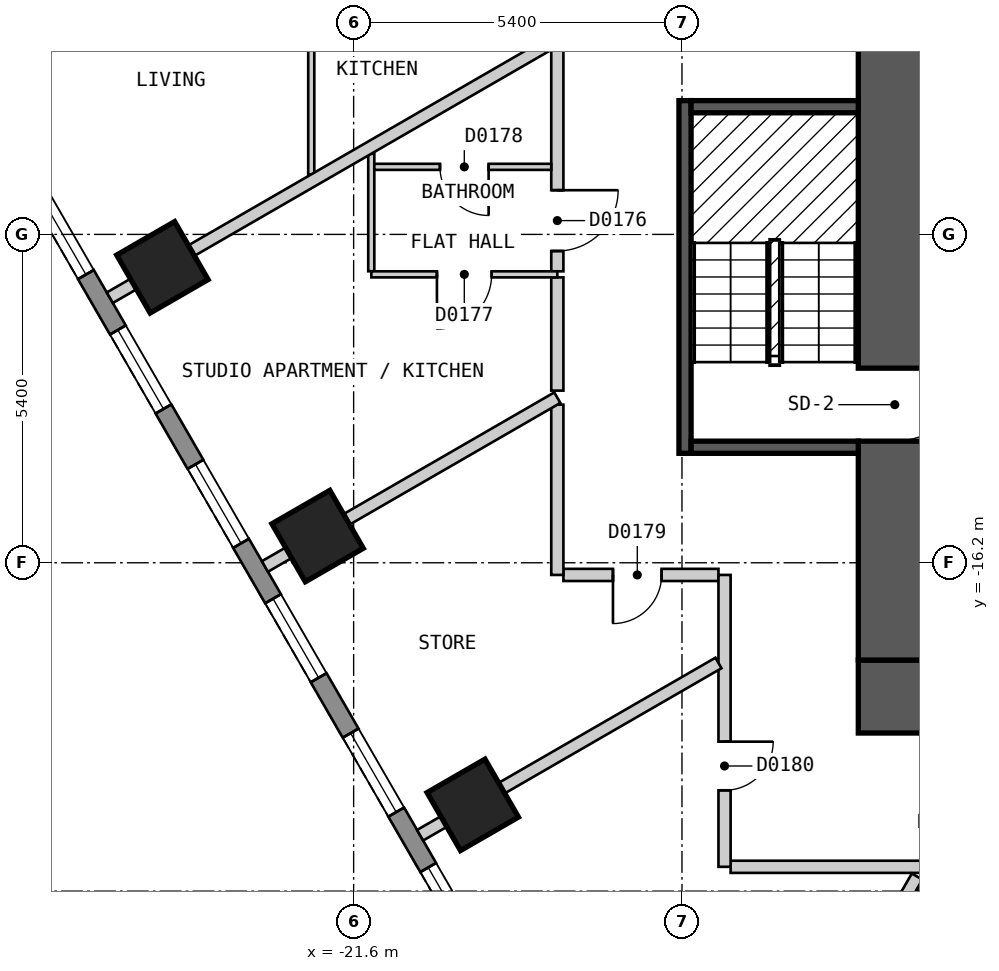
"""IFC4 building model, lengths in metres.
Left out: names, types, materials, properties, quantities, classifications, styles, units other than length and angle.
Written with IfcOpenShell. Run it as: python <this file> out.ifc"""

import sys

from ifc_helpers import new_model, si_unit, direction, frame, frame_2d, origin, origin_2d, place, context, subcontext, project, spatial, polyline, rectangle, outline, extrude, element, fill, save


model = new_model("IFC4")
c1 = context("Model", 3, precision=1e-05, world=origin(), true_north=direction((0.0, 1.0)))
c2 = subcontext(c1, "Body", "Model", "MODEL_VIEW")
j1 = project(units=[si_unit("LENGTHUNIT", "METRE"), si_unit("PLANEANGLEUNIT", "RADIAN")], contexts=[c1])
p1 = place(None, origin())
s1 = spatial("IfcSite", under=j1, at=p1, CompositionType="ELEMENT")
p2 = place(p1, origin())
s2 = spatial("IfcBuilding", under=s1, at=p2, CompositionType="ELEMENT")
p3 = place(p2, frame((0.0, 0.0, 23.4)))
s3 = spatial("IfcBuildingStorey", under=s2, at=p3, CompositionType="ELEMENT", Elevation=23.4)
for number, where, z_axis, x_axis in (
    (1, (-24.745, -11.341, 0.0), (0.0, 0.0, 1.0), (0.5, -0.866, 0.0)),
    (2, (-22.193, -15.761, 0.0), (0.0, 0.0, 1.0), (0.5, -0.866, 0.0)),
    (3, (-19.641, -20.181, 0.0), (0.0, 0.0, 1.0), (0.5, -0.866, 0.0)),
):
    element("IfcColumn", number, at=place(p3, frame(where, z_axis=z_axis, x_axis=x_axis)), inside=s3, PredefinedType="COLUMN", context=c2, shape_type="SweptSolid", body=[
        extrude(rectangle(XDim=1.1, YDim=1.1, at=origin_2d()), origin(), (0.0, 0.0, 1.0), 3.0),
    ])
p4 = place(p3, frame((-13.3, -18.4, 0.0), z_axis=(0.0, 0.0, 1.0), x_axis=(1.0, 0.0, 0.0)))
e4 = element("IfcWall", 4, at=p4, inside=s3, PredefinedType="SHEAR", context=c2, shape_type="SweptSolid", body=[
    extrude(rectangle(XDim=26.6, YDim=1.2, at=frame_2d((13.3, 0.0))), origin(), (0.0, 0.0, 1.0), 2.7),
])
p5 = place(p3, frame((-12.7, -17.8, 0.0), z_axis=(0.0, 0.0, 1.0), x_axis=(0.0, 1.0, 0.0)))
e5 = element("IfcWall", 5, at=p5, inside=s3, PredefinedType="SHEAR", context=c2, shape_type="SweptSolid", body=[
    extrude(rectangle(XDim=11.6, YDim=1.2, at=frame_2d((5.8, 0.0))), origin(), (0.0, 0.0, 1.0), 2.7),
])
p6 = place(p5, frame((3.6, 0.0, 0.0)))
e6 = element("IfcOpeningElement", 6, at=p6, cuts=e5, PredefinedType="OPENING", context=c2, shape_type="SweptSolid", body=[
    extrude(rectangle(XDim=1.2, YDim=2.1, at=frame_2d((0.6, 1.05))), frame((0.0, 0.61, 0.0), z_axis=(0.0, -1.0, 0.0), x_axis=(1.0, 0.0, 0.0)), (0.0, 0.0, 1.0), 1.22),
])
p7 = place(p3, frame((-31.22, -2.425, 0.0), z_axis=(0.0, 0.0, 1.0), x_axis=(0.500001938803, -0.866024284413, 0.0)))
e7 = element("IfcWall", 7, at=p7, inside=s3, PredefinedType="SOLIDWALL", context=c2, shape_type="SweptSolid", body=[
    extrude(outline(polyline([(0.0, -0.15), (27.02, -0.15), (26.94, 0.15), (0.08, 0.15), (0.0, -0.15)])), origin(), (0.0, 0.0, 1.0), 2.7),
])
p8 = place(p7, frame((1.277, 0.0, 0.15)))
e8 = element("IfcOpeningElement", 8, at=p8, cuts=e7, PredefinedType="OPENING", context=c2, shape_type="SweptSolid", body=[
    extrude(rectangle(XDim=1.5, YDim=2.1, at=frame_2d((0.75, 1.05))), frame((0.0, 0.16, 0.0), z_axis=(0.0, -1.0, 0.0), x_axis=(1.0, 0.0, 0.0)), (0.0, 0.0, 1.0), 0.32),
])
p9 = place(p7, frame((3.829, 0.0, 0.15)))
e9 = element("IfcOpeningElement", 9, at=p9, cuts=e7, PredefinedType="OPENING", context=c2, shape_type="SweptSolid", body=[
    extrude(rectangle(XDim=1.5, YDim=2.1, at=frame_2d((0.75, 1.05))), frame((0.0, 0.16, 0.0), z_axis=(0.0, -1.0, 0.0), x_axis=(1.0, 0.0, 0.0)), (0.0, 0.0, 1.0), 0.32),
])
p10 = place(p7, frame((6.382, 0.0, 0.15)))
e10 = element("IfcOpeningElement", 10, at=p10, cuts=e7, PredefinedType="OPENING", context=c2, shape_type="SweptSolid", body=[
    extrude(rectangle(XDim=1.5, YDim=2.1, at=frame_2d((0.75, 1.05))), frame((0.0, 0.16, 0.0), z_axis=(0.0, -1.0, 0.0), x_axis=(1.0, 0.0, 0.0)), (0.0, 0.0, 1.0), 0.32),
])
p11 = place(p7, frame((8.933, 0.0, 0.15)))
e11 = element("IfcOpeningElement", 11, at=p11, cuts=e7, PredefinedType="OPENING", context=c2, shape_type="SweptSolid", body=[
    extrude(rectangle(XDim=1.5, YDim=2.1, at=frame_2d((0.75, 1.05))), frame((0.0, 0.16, 0.0), z_axis=(0.0, -1.0, 0.0), x_axis=(1.0, 0.0, 0.0)), (0.0, 0.0, 1.0), 0.32),
])
p12 = place(p7, frame((11.485, 0.0, 0.15)))
e12 = element("IfcOpeningElement", 12, at=p12, cuts=e7, PredefinedType="OPENING", context=c2, shape_type="SweptSolid", body=[
    extrude(rectangle(XDim=1.5, YDim=2.1, at=frame_2d((0.75, 1.05))), frame((0.0, 0.16, 0.0), z_axis=(0.0, -1.0, 0.0), x_axis=(1.0, 0.0, 0.0)), (0.0, 0.0, 1.0), 0.32),
])
p13 = place(p7, frame((14.037, 0.0, 0.15)))
e13 = element("IfcOpeningElement", 13, at=p13, cuts=e7, PredefinedType="OPENING", context=c2, shape_type="SweptSolid", body=[
    extrude(rectangle(XDim=1.5, YDim=2.1, at=frame_2d((0.75, 1.05))), frame((0.0, 0.16, 0.0), z_axis=(0.0, -1.0, 0.0), x_axis=(1.0, 0.0, 0.0)), (0.0, 0.0, 1.0), 0.32),
])
p14 = place(p7, frame((16.589, 0.0, 0.15)))
e14 = element("IfcOpeningElement", 14, at=p14, cuts=e7, PredefinedType="OPENING", context=c2, shape_type="SweptSolid", body=[
    extrude(rectangle(XDim=1.5, YDim=2.1, at=frame_2d((0.75, 1.05))), frame((0.0, 0.16, 0.0), z_axis=(0.0, -1.0, 0.0), x_axis=(1.0, 0.0, 0.0)), (0.0, 0.0, 1.0), 0.32),
])
p15 = place(p7, frame((19.141, 0.0, 0.15)))
e15 = element("IfcOpeningElement", 15, at=p15, cuts=e7, PredefinedType="OPENING", context=c2, shape_type="SweptSolid", body=[
    extrude(rectangle(XDim=1.5, YDim=2.1, at=frame_2d((0.75, 1.05))), frame((0.0, 0.16, 0.0), z_axis=(0.0, -1.0, 0.0), x_axis=(1.0, 0.0, 0.0)), (0.0, 0.0, 1.0), 0.32),
])
p16 = place(p7, frame((21.693, 0.0, 0.15)))
e16 = element("IfcOpeningElement", 16, at=p16, cuts=e7, PredefinedType="OPENING", context=c2, shape_type="SweptSolid", body=[
    extrude(rectangle(XDim=1.5, YDim=2.1, at=frame_2d((0.75, 1.05))), frame((0.0, 0.16, 0.0), z_axis=(0.0, -1.0, 0.0), x_axis=(1.0, 0.0, 0.0)), (0.0, 0.0, 1.0), 0.32),
])
p17 = place(p7, frame((24.244, 0.0, 0.15)))
e17 = element("IfcOpeningElement", 17, at=p17, cuts=e7, PredefinedType="OPENING", context=c2, shape_type="SweptSolid", body=[
    extrude(rectangle(XDim=1.5, YDim=2.1, at=frame_2d((0.75, 1.05))), frame((0.0, 0.16, 0.0), z_axis=(0.0, -1.0, 0.0), x_axis=(1.0, 0.0, 0.0)), (0.0, 0.0, 1.0), 0.32),
])
p18 = place(p3, frame((-18.25, -11.507, 0.0), z_axis=(0.0, 0.0, 1.0), x_axis=(0.0, -1.0, 0.0)))
e18 = element("IfcWall", 18, at=p18, inside=s3, PredefinedType="PARTITIONING", context=c2, shape_type="SweptSolid", body=[
    extrude(rectangle(XDim=1.862, YDim=0.2, at=frame_2d((0.931, 0.0))), origin(), (0.0, 0.0, 1.0), 2.7),
])
p19 = place(p3, frame((-18.15, -16.4, 0.0), z_axis=(0.0, 0.0, 1.0), x_axis=(1.0, 0.0, 0.0)))
e19 = element("IfcWall", 19, at=p19, inside=s3, PredefinedType="PARTITIONING", context=c2, shape_type="SweptSolid", body=[
    extrude(rectangle(XDim=2.55, YDim=0.2, at=frame_2d((1.275, 0.0))), origin(), (0.0, 0.0, 1.0), 2.7),
])
p20 = place(p19, frame((0.815, 0.0, 0.0)))
e20 = element("IfcOpeningElement", 20, at=p20, cuts=e19, PredefinedType="OPENING", context=c2, shape_type="SweptSolid", body=[
    extrude(rectangle(XDim=0.8, YDim=2.1, at=frame_2d((0.4, 1.05))), frame((0.0, 0.11, 0.0), z_axis=(0.0, -1.0, 0.0), x_axis=(1.0, 0.0, 0.0)), (0.0, 0.0, 1.0), 0.22),
])
p21 = place(p3, frame((-15.4, -21.2, 0.0), z_axis=(0.0, 0.0, 1.0), x_axis=(1.0, 0.0, 0.0)))
e21 = element("IfcWall", 21, at=p21, inside=s3, PredefinedType="PARTITIONING", context=c2, shape_type="SweptSolid", body=[
    extrude(rectangle(XDim=30.799, YDim=0.2, at=frame_2d((15.399, 0.0))), origin(), (0.0, 0.0, 1.0), 2.7),
])
p22 = place(p21, frame((4.985, 0.0, 0.0)))
e22 = element("IfcOpeningElement", 22, at=p22, cuts=e21, PredefinedType="OPENING", context=c2, shape_type="SweptSolid", body=[
    extrude(rectangle(XDim=0.9, YDim=2.1, at=frame_2d((0.45, 1.05))), frame((0.0, 0.11, 0.0), z_axis=(0.0, -1.0, 0.0), x_axis=(1.0, 0.0, 0.0)), (0.0, 0.0, 1.0), 0.22),
])
p23 = place(p21, frame((14.901, 0.0, 0.0)))
e23 = element("IfcOpeningElement", 23, at=p23, cuts=e21, PredefinedType="OPENING", context=c2, shape_type="SweptSolid", body=[
    extrude(rectangle(XDim=1.0, YDim=2.1, at=frame_2d((0.5, 1.05))), frame((0.0, 0.11, 0.0), z_axis=(0.0, -1.0, 0.0), x_axis=(1.0, 0.0, 0.0)), (0.0, 0.0, 1.0), 0.22),
])
p24 = place(p21, frame((20.005, 0.0, 0.0)))
e24 = element("IfcOpeningElement", 24, at=p24, cuts=e21, PredefinedType="OPENING", context=c2, shape_type="SweptSolid", body=[
    extrude(rectangle(XDim=1.0, YDim=2.1, at=frame_2d((0.5, 1.05))), frame((0.0, 0.11, 0.0), z_axis=(0.0, -1.0, 0.0), x_axis=(1.0, 0.0, 0.0)), (0.0, 0.0, 1.0), 0.22),
])
p25 = place(p21, frame((24.916, 0.0, 0.0)))
e25 = element("IfcOpeningElement", 25, at=p25, cuts=e21, PredefinedType="OPENING", context=c2, shape_type="SweptSolid", body=[
    extrude(rectangle(XDim=0.9, YDim=2.1, at=frame_2d((0.45, 1.05))), frame((0.0, 0.11, 0.0), z_axis=(0.0, -1.0, 0.0), x_axis=(1.0, 0.0, 0.0)), (0.0, 0.0, 1.0), 0.22),
])
p26 = place(p3, frame((-15.5, -21.2, 0.0), z_axis=(0.0, 0.0, 1.0), x_axis=(0.0, 1.0, 0.0)))
e26 = element("IfcWall", 26, at=p26, inside=s3, PredefinedType="PARTITIONING", context=c2, shape_type="SweptSolid", body=[
    extrude(rectangle(XDim=4.8, YDim=0.2, at=frame_2d((2.4, 0.0))), origin(), (0.0, 0.0, 1.0), 2.7),
])
p27 = place(p26, frame((1.258, 0.0, 0.0)))
e27 = element("IfcOpeningElement", 27, at=p27, cuts=e26, PredefinedType="OPENING", context=c2, shape_type="SweptSolid", body=[
    extrude(rectangle(XDim=0.8, YDim=2.1, at=frame_2d((0.4, 1.05))), frame((0.0, 0.11, 0.0), z_axis=(0.0, -1.0, 0.0), x_axis=(1.0, 0.0, 0.0)), (0.0, 0.0, 1.0), 0.22),
])
p28 = place(p3, frame((-18.25, -16.4, 0.0), z_axis=(0.0, 0.0, 1.0), x_axis=(0.0, 1.0, 0.0)))
e28 = element("IfcWall", 28, at=p28, inside=s3, PredefinedType="PARTITIONING", context=c2, shape_type="SweptSolid", body=[
    extrude(rectangle(XDim=2.8, YDim=0.2, at=frame_2d((1.4, 0.0))), origin(), (0.0, 0.0, 1.0), 2.7),
])
p29 = place(p3, frame((-18.25, -11.407, 0.0), z_axis=(0.0, 0.0, 1.0), x_axis=(0.0, 1.0, 0.0)))
e29 = element("IfcWall", 29, at=p29, inside=s3, PredefinedType="PARTITIONING", context=c2, shape_type="SweptSolid", body=[
    extrude(rectangle(XDim=3.665, YDim=0.2, at=frame_2d((1.833, 0.0))), origin(), (0.0, 0.0, 1.0), 2.7),
])
p30 = place(p29, frame((0.334, 0.0, 0.0)))
e30 = element("IfcOpeningElement", 30, at=p30, cuts=e29, PredefinedType="OPENING", context=c2, shape_type="SweptSolid", body=[
    extrude(rectangle(XDim=1.0, YDim=2.1, at=frame_2d((0.5, 1.05))), frame((0.0, 0.11, 0.0), z_axis=(0.0, -1.0, 0.0), x_axis=(1.0, 0.0, 0.0)), (0.0, 0.0, 1.0), 0.22),
])
p31 = place(p3, frame((-12.275, -21.46, 0.0), z_axis=(0.0, 0.0, 1.0), x_axis=(0.0, -1.0, 0.0)))
e31 = element("IfcWall", 31, at=p31, inside=s3, PredefinedType="PARTITIONING", context=c2, shape_type="SweptSolid", body=[
    extrude(rectangle(XDim=2.349, YDim=0.1, at=frame_2d((1.175, 0.0))), origin(), (0.0, 0.0, 1.0), 2.7),
])
p32 = place(p3, frame((-21.31, -9.474, 0.0), z_axis=(0.0, 0.0, 1.0), x_axis=(0.0, -1.0, 0.0)))
e32 = element("IfcWall", 32, at=p32, inside=s3, PredefinedType="PARTITIONING", context=c2, shape_type="SweptSolid", body=[
    extrude(rectangle(XDim=1.932, YDim=0.1, at=frame_2d((0.966, 0.0))), origin(), (0.0, 0.0, 1.0), 2.7),
])
p33 = place(p3, frame((-21.26, -9.689, 0.0), z_axis=(0.0, 0.0, 1.0), x_axis=(1.0, 0.0, 0.0)))
e33 = element("IfcWall", 33, at=p33, inside=s3, PredefinedType="PARTITIONING", context=c2, shape_type="SweptSolid", body=[
    extrude(rectangle(XDim=2.91, YDim=0.1, at=frame_2d((1.455, 0.0))), origin(), (0.0, 0.0, 1.0), 2.7),
])
p34 = place(p33, frame((1.08, 0.0, 0.0)))
e34 = element("IfcOpeningElement", 34, at=p34, cuts=e33, PredefinedType="OPENING", context=c2, shape_type="SweptSolid", body=[
    extrude(rectangle(XDim=0.8, YDim=2.1, at=frame_2d((0.4, 1.05))), frame((0.0, 0.06, 0.0), z_axis=(0.0, -1.0, 0.0), x_axis=(1.0, 0.0, 0.0)), (0.0, 0.0, 1.0), 0.12),
])
p35 = place(p3, frame((-21.309, -11.457, 0.0), z_axis=(0.0, 0.0, 1.0), x_axis=(1.0, 0.0, 0.0)))
e35 = element("IfcWall", 35, at=p35, inside=s3, PredefinedType="PARTITIONING", context=c2, shape_type="SweptSolid", body=[
    extrude(rectangle(XDim=3.059, YDim=0.1, at=frame_2d((1.53, 0.0))), origin(), (0.0, 0.0, 1.0), 2.7),
])
p36 = place(p35, frame((1.079, 0.0, 0.0)))
e36 = element("IfcOpeningElement", 36, at=p36, cuts=e35, PredefinedType="OPENING", context=c2, shape_type="SweptSolid", body=[
    extrude(rectangle(XDim=0.9, YDim=2.1, at=frame_2d((0.45, 1.05))), frame((0.0, 0.06, 0.0), z_axis=(0.0, -1.0, 0.0), x_axis=(1.0, 0.0, 0.0)), (0.0, 0.0, 1.0), 0.12),
])
p37 = place(p3, frame((-22.297, -9.813, 0.0), z_axis=(0.0, 0.0, 1.0), x_axis=(0.0, 1.0, 0.0)))
e37 = element("IfcWall", 37, at=p37, inside=s3, PredefinedType="PARTITIONING", context=c2, shape_type="SweptSolid", body=[
    extrude(rectangle(XDim=4.184, YDim=0.1, at=frame_2d((2.092, 0.0))), origin(), (0.0, 0.0, 1.0), 2.7),
])
p38 = place(p37, frame((2.894, 0.0, 0.0)))
e38 = element("IfcOpeningElement", 38, at=p38, cuts=e37, PredefinedType="OPENING", context=c2, shape_type="SweptSolid", body=[
    extrude(rectangle(XDim=0.9, YDim=2.1, at=frame_2d((0.45, 1.05))), frame((0.0, 0.06, 0.0), z_axis=(0.0, -1.0, 0.0), x_axis=(1.0, 0.0, 0.0)), (0.0, 0.0, 1.0), 0.12),
])
p39 = place(p3, frame((-12.661, -21.929, 0.0), z_axis=(0.0, 0.0, 1.0), x_axis=(0.499379051742, 0.866383611734, 0.0)))
e39 = element("IfcWall", 39, at=p39, inside=s3, PredefinedType="PARTITIONING", context=c2, shape_type="SweptSolid", body=[
    extrude(rectangle(XDim=0.656, YDim=0.2, at=frame_2d((0.328, 0.0))), origin(), (0.0, 0.0, 1.0), 2.7),
])
p40 = place(p3, frame((-20.507, -20.681, 0.0), z_axis=(0.0, 0.0, 1.0), x_axis=(0.866028446103, 0.499994730513, 0.0)))
e40 = element("IfcWall", 40, at=p40, inside=s3, PredefinedType="PARTITIONING", context=c2, shape_type="SweptSolid", body=[
    extrude(rectangle(XDim=5.666, YDim=0.2, at=frame_2d((2.833, 0.0))), origin(), (0.0, 0.0, 1.0), 2.7),
])
p41 = place(p3, frame((-23.059, -16.261, 0.0), z_axis=(0.0, 0.0, 1.0), x_axis=(0.866075767886, 0.499912756669, 0.0)))
e41 = element("IfcWall", 41, at=p41, inside=s3, PredefinedType="PARTITIONING", context=c2, shape_type="SweptSolid", body=[
    extrude(rectangle(XDim=5.553, YDim=0.2, at=frame_2d((2.776, 0.0))), origin(), (0.0, 0.0, 1.0), 2.7),
])
p42 = place(p3, frame((-25.61, -11.841, 0.0), z_axis=(0.0, 0.0, 1.0), x_axis=(0.866019023803, 0.500011050288, 0.0)))
e42 = element("IfcWall", 42, at=p42, inside=s3, PredefinedType="PARTITIONING", context=c2, shape_type="SweptSolid", body=[
    extrude(rectangle(XDim=8.47, YDim=0.2, at=frame_2d((4.235, 0.0))), origin(), (0.0, 0.0, 1.0), 2.7),
])
p43 = place(p3, frame((-16.15, -14.4, 0.0), z_axis=(0.0, 0.0, 1.0), x_axis=(0.0, 1.0, 0.0)))
e43 = element("IfcWall", 43, at=p43, inside=s3, PredefinedType="SOLIDWALL", context=c2, shape_type="SweptSolid", body=[
    extrude(rectangle(XDim=5.8, YDim=0.2, at=frame_2d((2.9, 0.0))), origin(), (0.0, 0.0, 1.0), 2.7),
])
for number, where, z_axis, x_axis in (
    (44, (-16.05, -14.3, 0.0), (0.0, 0.0, 1.0), (1.0, 0.0, 0.0)),
    (45, (-16.05, -8.7, 0.0), (0.0, 0.0, 1.0), (1.0, 0.0, 0.0)),
):
    element("IfcWall", number, at=place(p3, frame(where, z_axis=z_axis, x_axis=x_axis)), inside=s3, PredefinedType="SOLIDWALL", context=c2, shape_type="SweptSolid", body=[
        extrude(rectangle(XDim=2.75, YDim=0.2, at=frame_2d((1.375, 0.0))), origin(), (0.0, 0.0, 1.0), 2.7),
    ])
p44 = place(p11, origin())
e46 = element("IfcWindow", 46, at=p44, inside=s3, PartitioningType="SINGLE_PANEL", PredefinedType="WINDOW", context=c2, shape_type="SweptSolid", body=[
    extrude(rectangle(XDim=1.5, YDim=2.1, at=frame_2d((0.75, 1.05))), frame((0.0, 0.03, 0.0), z_axis=(0.0, -1.0, 0.0), x_axis=(1.0, 0.0, 0.0)), (0.0, 0.0, 1.0), 0.06),
])
fill(e11, e46)
p45 = place(p12, origin())
e47 = element("IfcWindow", 47, at=p45, inside=s3, PartitioningType="SINGLE_PANEL", PredefinedType="WINDOW", context=c2, shape_type="SweptSolid", body=[
    extrude(rectangle(XDim=1.5, YDim=2.1, at=frame_2d((0.75, 1.05))), frame((0.0, 0.03, 0.0), z_axis=(0.0, -1.0, 0.0), x_axis=(1.0, 0.0, 0.0)), (0.0, 0.0, 1.0), 0.06),
])
fill(e12, e47)
p46 = place(p13, origin())
e48 = element("IfcWindow", 48, at=p46, inside=s3, PartitioningType="SINGLE_PANEL", PredefinedType="WINDOW", context=c2, shape_type="SweptSolid", body=[
    extrude(rectangle(XDim=1.5, YDim=2.1, at=frame_2d((0.75, 1.05))), frame((0.0, 0.03, 0.0), z_axis=(0.0, -1.0, 0.0), x_axis=(1.0, 0.0, 0.0)), (0.0, 0.0, 1.0), 0.06),
])
fill(e13, e48)
p47 = place(p14, origin())
e49 = element("IfcWindow", 49, at=p47, inside=s3, PartitioningType="SINGLE_PANEL", PredefinedType="WINDOW", context=c2, shape_type="SweptSolid", body=[
    extrude(rectangle(XDim=1.5, YDim=2.1, at=frame_2d((0.75, 1.05))), frame((0.0, 0.03, 0.0), z_axis=(0.0, -1.0, 0.0), x_axis=(1.0, 0.0, 0.0)), (0.0, 0.0, 1.0), 0.06),
])
fill(e14, e49)
p48 = place(p15, origin())
e50 = element("IfcWindow", 50, at=p48, inside=s3, PartitioningType="SINGLE_PANEL", PredefinedType="WINDOW", context=c2, shape_type="SweptSolid", body=[
    extrude(rectangle(XDim=1.5, YDim=2.1, at=frame_2d((0.75, 1.05))), frame((0.0, 0.03, 0.0), z_axis=(0.0, -1.0, 0.0), x_axis=(1.0, 0.0, 0.0)), (0.0, 0.0, 1.0), 0.06),
])
fill(e15, e50)
p49 = place(p16, origin())
e51 = element("IfcWindow", 51, at=p49, inside=s3, PartitioningType="SINGLE_PANEL", PredefinedType="WINDOW", context=c2, shape_type="SweptSolid", body=[
    extrude(rectangle(XDim=1.5, YDim=2.1, at=frame_2d((0.75, 1.05))), frame((0.0, 0.03, 0.0), z_axis=(0.0, -1.0, 0.0), x_axis=(1.0, 0.0, 0.0)), (0.0, 0.0, 1.0), 0.06),
])
fill(e16, e51)
p50 = place(p30, origin())
e52 = element("IfcDoor", 52, at=p50, inside=s3, OperationType="SINGLE_SWING_RIGHT", PredefinedType="DOOR", context=c2, shape_type="SweptSolid", body=[
    extrude(rectangle(XDim=1.0, YDim=2.1, at=frame_2d((0.5, 1.05))), frame((0.0, 0.025, 0.0), z_axis=(0.0, -1.0, 0.0), x_axis=(1.0, 0.0, 0.0)), (0.0, 0.0, 1.0), 0.05),
])
fill(e30, e52)
p51 = place(p36, origin())
e53 = element("IfcDoor", 53, at=p51, inside=s3, OperationType="SINGLE_SWING_LEFT", PredefinedType="DOOR", context=c2, shape_type="SweptSolid", body=[
    extrude(rectangle(XDim=0.9, YDim=2.1, at=frame_2d((0.45, 1.05))), frame((0.0, 0.025, 0.0), z_axis=(0.0, -1.0, 0.0), x_axis=(1.0, 0.0, 0.0)), (0.0, 0.0, 1.0), 0.05),
])
fill(e36, e53)
p52 = place(p34, origin())
e54 = element("IfcDoor", 54, at=p52, inside=s3, OperationType="SINGLE_SWING_RIGHT", PredefinedType="DOOR", context=c2, shape_type="SweptSolid", body=[
    extrude(rectangle(XDim=0.8, YDim=2.1, at=frame_2d((0.4, 1.05))), frame((0.0, 0.025, 0.0), z_axis=(0.0, -1.0, 0.0), x_axis=(1.0, 0.0, 0.0)), (0.0, 0.0, 1.0), 0.05),
])
fill(e34, e54)
p53 = place(p20, origin())
e55 = element("IfcDoor", 55, at=p53, inside=s3, OperationType="SINGLE_SWING_LEFT", PredefinedType="DOOR", context=c2, shape_type="SweptSolid", body=[
    extrude(rectangle(XDim=0.8, YDim=2.1, at=frame_2d((0.4, 1.05))), frame((0.0, 0.025, 0.0), z_axis=(0.0, -1.0, 0.0), x_axis=(1.0, 0.0, 0.0)), (0.0, 0.0, 1.0), 0.05),
])
fill(e20, e55)
p54 = place(p27, origin())
e56 = element("IfcDoor", 56, at=p54, inside=s3, OperationType="SINGLE_SWING_RIGHT", PredefinedType="DOOR", context=c2, shape_type="SweptSolid", body=[
    extrude(rectangle(XDim=0.8, YDim=2.1, at=frame_2d((0.4, 1.05))), frame((0.0, 0.025, 0.0), z_axis=(0.0, -1.0, 0.0), x_axis=(1.0, 0.0, 0.0)), (0.0, 0.0, 1.0), 0.05),
])
fill(e27, e56)
p55 = place(p6, origin())
e57 = element("IfcDoor", 57, at=p55, inside=s3, OperationType="SINGLE_SWING_RIGHT", PredefinedType="DOOR", context=c2, shape_type="SweptSolid", body=[
    extrude(rectangle(XDim=1.2, YDim=2.1, at=frame_2d((0.6, 1.05))), frame((0.0, 0.025, 0.0), z_axis=(0.0, -1.0, 0.0), x_axis=(1.0, 0.0, 0.0)), (0.0, 0.0, 1.0), 0.05),
])
fill(e6, e57)
save(model, sys.argv[1])
